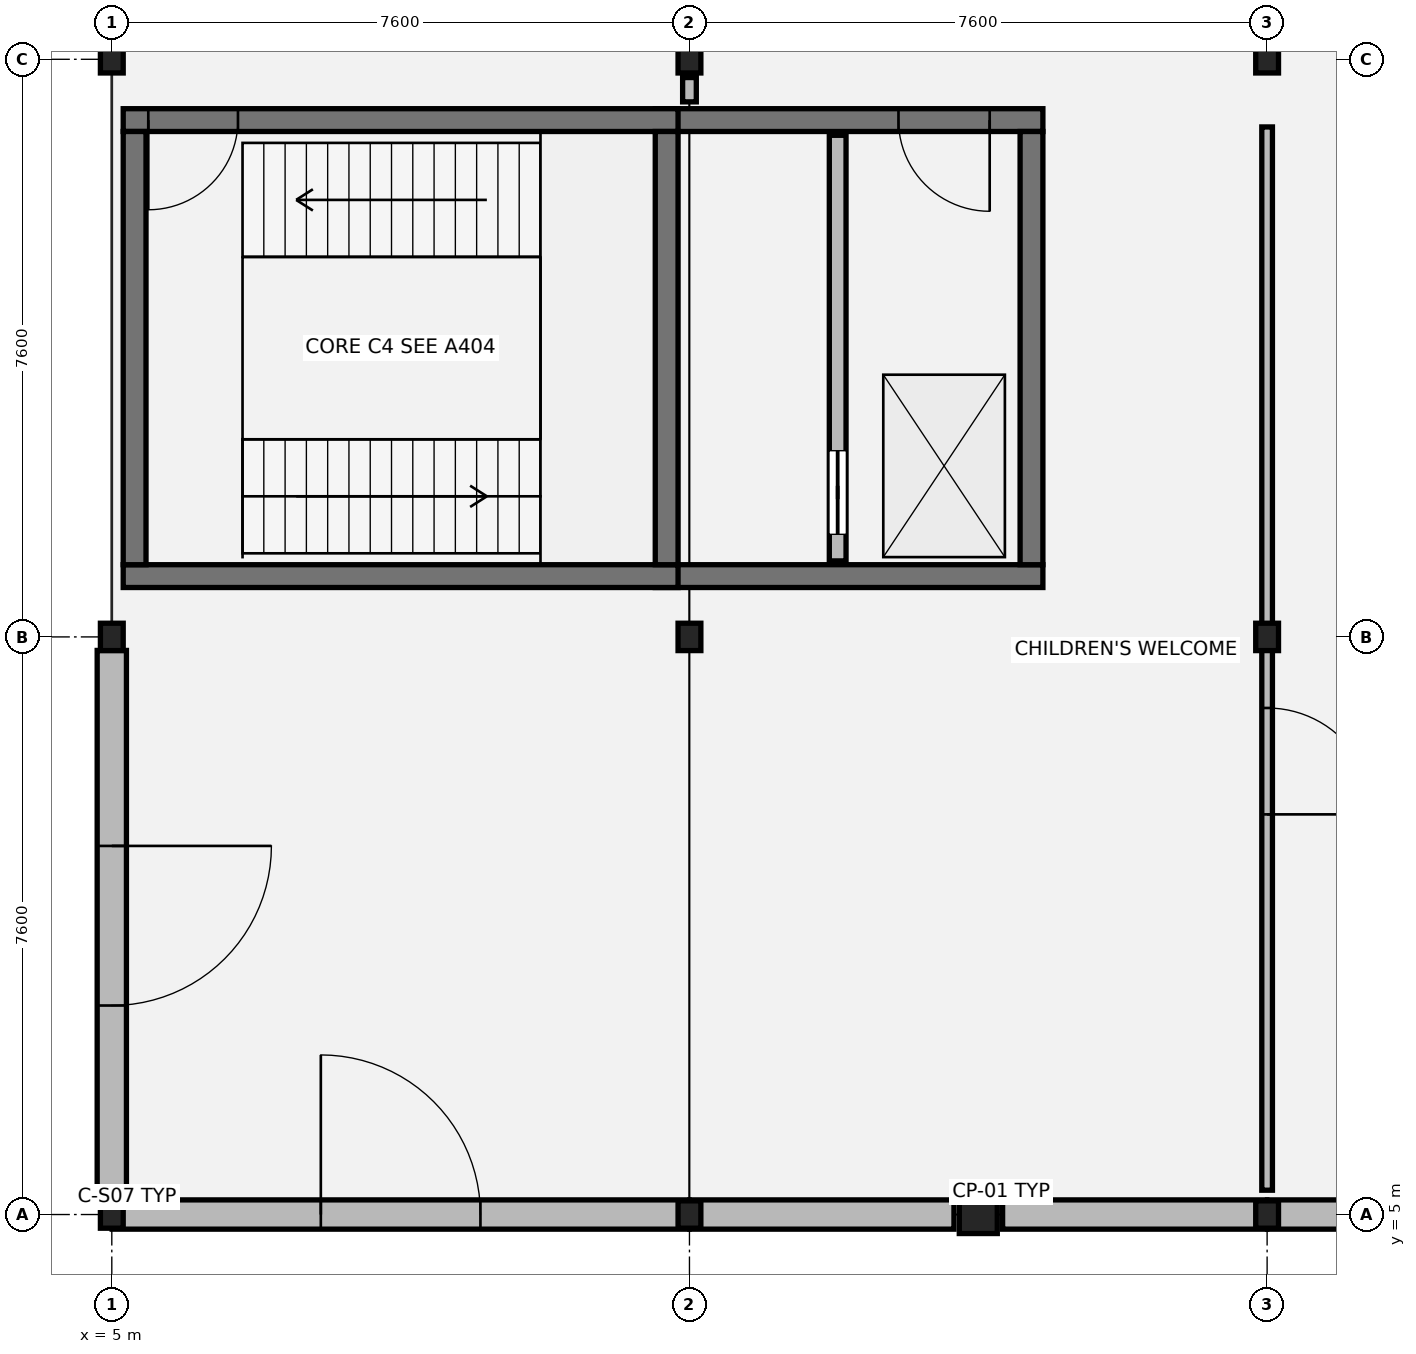
"""IFC4 building model, lengths in metres.
Left out: names, types, materials, properties, quantities, classifications, styles, units other than length and angle.
Written with IfcOpenShell. Run it as: python <this file> out.ifc"""

import sys

from ifc_helpers import new_model, si_unit, direction, frame, frame_2d, origin, origin_2d, place, context, subcontext, project, spatial, rectangle, i_section, extrude, element, fill, save


model = new_model("IFC4")
c1 = context("Model", 3, precision=1e-05, world=origin(), true_north=direction((0.0, 1.0)))
c2 = subcontext(c1, "Body", "Model", "MODEL_VIEW")
j1 = project(units=[si_unit("LENGTHUNIT", "METRE"), si_unit("PLANEANGLEUNIT", "RADIAN")], contexts=[c1])
p1 = place(None, origin())
s1 = spatial("IfcSite", under=j1, at=p1, CompositionType="ELEMENT")
p2 = place(p1, origin())
s2 = spatial("IfcBuilding", under=s1, at=p2, CompositionType="ELEMENT")
p3 = place(p2, origin())
s3 = spatial("IfcBuildingStorey", under=s2, at=p3, CompositionType="ELEMENT", Elevation=0.0)
for number, where, z_axis, x_axis in (
    (1, (5.0, 5.0, 0.0), (0.0, 0.0, 1.0), (1.0, 0.0, 0.0)),
    (2, (5.0, 12.6, 0.0), (0.0, 0.0, 1.0), (1.0, 0.0, 0.0)),
    (3, (5.0, 20.2, 0.0), (0.0, 0.0, 1.0), (1.0, 0.0, 0.0)),
    (4, (12.6, 5.0, 0.0), (0.0, 0.0, 1.0), (1.0, 0.0, 0.0)),
    (5, (12.6, 12.6, 0.0), (0.0, 0.0, 1.0), (1.0, 0.0, 0.0)),
    (6, (12.6, 20.2, 0.0), (0.0, 0.0, 1.0), (1.0, 0.0, 0.0)),
    (7, (20.2, 5.0, 0.0), (0.0, 0.0, 1.0), (1.0, 0.0, 0.0)),
    (8, (20.2, 12.6, 0.0), (0.0, 0.0, 1.0), (1.0, 0.0, 0.0)),
    (9, (20.2, 20.2, 0.0), (0.0, 0.0, 1.0), (1.0, 0.0, 0.0)),
):
    element("IfcColumn", number, at=place(p3, frame(where, z_axis=z_axis, x_axis=x_axis)), inside=s3, PredefinedType="COLUMN", context=c2, shape_type="SweptSolid", body=[
        extrude(i_section(OverallWidth=0.3, OverallDepth=0.36, WebThickness=0.012, FlangeThickness=0.022, at=origin_2d()), origin(), (0.0, 0.0, 1.0), 5.075),
    ])
p4 = place(p3, frame((16.4, 5.0, 0.0), z_axis=(0.0, 0.0, 1.0), x_axis=(1.0, 0.0, 0.0)))
e10 = element("IfcColumn", 10, at=p4, inside=s3, PredefinedType="PILASTER", context=c2, shape_type="SweptSolid", body=[
    extrude(rectangle(XDim=0.5, YDim=0.5, at=origin_2d()), origin(), (0.0, 0.0, 1.0), 4.845),
])
p5 = place(p3, frame((5.005, 5.0, 0.0), z_axis=(0.0, 0.0, 1.0), x_axis=(1.0, 0.0, 0.0)))
e11 = element("IfcWall", 11, at=p5, inside=s3, PredefinedType="SOLIDWALL", context=c2, shape_type="SweptSolid", body=[
    extrude(rectangle(XDim=7.59, YDim=0.385, at=frame_2d((3.795, 0.0))), origin(), (0.0, 0.0, 1.0), 4.5),
])
p6 = place(p5, frame((2.745, 0.0, 0.0)))
e12 = element("IfcOpeningElement", 12, at=p6, cuts=e11, PredefinedType="OPENING", context=c2, shape_type="SweptSolid", body=[
    extrude(rectangle(XDim=2.1, YDim=2.48, at=frame_2d((1.05, 1.24))), frame((0.0, 0.202, 0.0), z_axis=(0.0, -1.0, 0.0), x_axis=(1.0, 0.0, 0.0)), (0.0, 0.0, 1.0), 0.405),
])
for number, where, z_axis, x_axis in (
    (13, (12.605, 5.0, 0.0), (0.0, 0.0, 1.0), (1.0, 0.0, 0.0)),
    (14, (16.72, 5.0, 0.0), (0.0, 0.0, 1.0), (1.0, 0.0, 0.0)),
):
    element("IfcWall", number, at=place(p3, frame(where, z_axis=z_axis, x_axis=x_axis)), inside=s3, PredefinedType="SOLIDWALL", context=c2, shape_type="SweptSolid", body=[
        extrude(rectangle(XDim=3.475, YDim=0.385, at=frame_2d((1.738, 0.0))), origin(), (0.0, 0.0, 1.0), 4.5),
    ])
p7 = place(p3, frame((20.205, 5.0, 0.0), z_axis=(0.0, 0.0, 1.0), x_axis=(1.0, 0.0, 0.0)))
e15 = element("IfcWall", 15, at=p7, inside=s3, PredefinedType="SOLIDWALL", context=c2, shape_type="SweptSolid", body=[
    extrude(rectangle(XDim=7.59, YDim=0.385, at=frame_2d((3.795, 0.0))), origin(), (0.0, 0.0, 1.0), 4.5),
])
p8 = place(p7, frame((2.595, 0.0, 0.0)))
e16 = element("IfcOpeningElement", 16, at=p8, cuts=e15, PredefinedType="OPENING", context=c2, shape_type="SweptSolid", body=[
    extrude(rectangle(XDim=2.4, YDim=2.6, at=frame_2d((1.2, 1.3))), frame((0.0, 0.202, 0.0), z_axis=(0.0, -1.0, 0.0), x_axis=(1.0, 0.0, 0.0)), (0.0, 0.0, 1.0), 0.405),
])
p9 = place(p3, frame((5.0, 12.422, 0.0), z_axis=(0.0, 0.0, 1.0), x_axis=(0.0, -1.0, 0.0)))
e17 = element("IfcWall", 17, at=p9, inside=s3, PredefinedType="SOLIDWALL", context=c2, shape_type="SweptSolid", body=[
    extrude(rectangle(XDim=7.244, YDim=0.385, at=frame_2d((3.622, 0.0))), origin(), (0.0, 0.0, 1.0), 4.5),
])
p10 = place(p9, frame((2.572, 0.0, 0.0)))
e18 = element("IfcOpeningElement", 18, at=p10, cuts=e17, PredefinedType="OPENING", context=c2, shape_type="SweptSolid", body=[
    extrude(rectangle(XDim=2.1, YDim=2.48, at=frame_2d((1.05, 1.24))), frame((0.0, 0.202, 0.0), z_axis=(0.0, -1.0, 0.0), x_axis=(1.0, 0.0, 0.0)), (0.0, 0.0, 1.0), 0.405),
])
p11 = place(p3, frame((12.15, 13.4, 0.0), z_axis=(0.0, 0.0, 1.0), x_axis=(1.0, 0.0, 0.0)))
e19 = element("IfcWall", 19, at=p11, inside=s3, PredefinedType="SHEAR", context=c2, shape_type="SweptSolid", body=[
    extrude(rectangle(XDim=5.1, YDim=0.3, at=frame_2d((2.55, 0.0))), origin(), (0.0, 0.0, 1.0), 4.922),
])
p12 = place(p3, frame((17.25, 19.4, 0.0), z_axis=(0.0, 0.0, 1.0), x_axis=(-1.0, 0.0, 0.0)))
e20 = element("IfcWall", 20, at=p12, inside=s3, PredefinedType="SHEAR", context=c2, shape_type="SweptSolid", body=[
    extrude(rectangle(XDim=5.1, YDim=0.3, at=frame_2d((2.55, 0.0))), origin(), (0.0, 0.0, 1.0), 4.922),
])
p13 = place(p12, frame((0.7, 0.0, 0.0)))
e21 = element("IfcOpeningElement", 21, at=p13, cuts=e20, PredefinedType="OPENING", context=c2, shape_type="SweptSolid", body=[
    extrude(rectangle(XDim=1.2, YDim=2.16, at=frame_2d((0.6, 1.08))), frame((0.0, 0.16, 0.0), z_axis=(0.0, -1.0, 0.0), x_axis=(1.0, 0.0, 0.0)), (0.0, 0.0, 1.0), 0.32),
])
p14 = place(p3, frame((17.1, 13.55, 0.0), z_axis=(0.0, 0.0, 1.0), x_axis=(0.0, 1.0, 0.0)))
e22 = element("IfcWall", 22, at=p14, inside=s3, PredefinedType="SHEAR", context=c2, shape_type="SweptSolid", body=[
    extrude(rectangle(XDim=5.7, YDim=0.3, at=frame_2d((2.85, 0.0))), origin(), (0.0, 0.0, 1.0), 4.922),
])
p15 = place(p3, frame((14.55, 13.6, 0.0), z_axis=(0.0, 0.0, 1.0), x_axis=(0.0, 1.0, 0.0)))
e23 = element("IfcWall", 23, at=p15, inside=s3, PredefinedType="SOLIDWALL", context=c2, shape_type="SweptSolid", body=[
    extrude(rectangle(XDim=5.6, YDim=0.22, at=frame_2d((2.8, 0.0))), origin(), (0.0, 0.0, 1.0), 4.922),
])
p16 = place(p15, frame((0.35, 0.0, 0.0)))
e24 = element("IfcOpeningElement", 24, at=p16, cuts=e23, PredefinedType="OPENING", context=c2, shape_type="SweptSolid", body=[
    extrude(rectangle(XDim=1.1, YDim=2.15, at=frame_2d((0.55, 1.075))), frame((0.0, 0.12, 0.0), z_axis=(0.0, -1.0, 0.0), x_axis=(1.0, 0.0, 0.0)), (0.0, 0.0, 1.0), 0.24),
])
p17 = place(p3, frame((5.15, 13.4, 0.0), z_axis=(0.0, 0.0, 1.0), x_axis=(1.0, 0.0, 0.0)))
e25 = element("IfcWall", 25, at=p17, inside=s3, PredefinedType="SHEAR", context=c2, shape_type="SweptSolid", body=[
    extrude(rectangle(XDim=7.3, YDim=0.3, at=frame_2d((3.65, 0.0))), origin(), (0.0, 0.0, 1.0), 4.922),
])
p18 = place(p3, frame((5.15, 19.4, 0.0), z_axis=(0.0, 0.0, 1.0), x_axis=(1.0, 0.0, 0.0)))
e26 = element("IfcWall", 26, at=p18, inside=s3, PredefinedType="SHEAR", context=c2, shape_type="SweptSolid", body=[
    extrude(rectangle(XDim=7.3, YDim=0.3, at=frame_2d((3.65, 0.0))), origin(), (0.0, 0.0, 1.0), 4.922),
])
p19 = place(p18, frame((0.33, 0.0, 0.0)))
e27 = element("IfcOpeningElement", 27, at=p19, cuts=e26, PredefinedType="OPENING", context=c2, shape_type="SweptSolid", body=[
    extrude(rectangle(XDim=1.18, YDim=2.18, at=frame_2d((0.59, 1.09))), frame((0.0, 0.16, 0.0), z_axis=(0.0, -1.0, 0.0), x_axis=(1.0, 0.0, 0.0)), (0.0, 0.0, 1.0), 0.32),
])
for number, where, z_axis, x_axis in (
    (28, (5.3, 13.55, 0.0), (0.0, 0.0, 1.0), (0.0, 1.0, 0.0)),
    (29, (12.3, 13.55, 0.0), (0.0, 0.0, 1.0), (0.0, 1.0, 0.0)),
):
    element("IfcWall", number, at=place(p3, frame(where, z_axis=z_axis, x_axis=x_axis)), inside=s3, PredefinedType="SHEAR", context=c2, shape_type="SweptSolid", body=[
        extrude(rectangle(XDim=5.7, YDim=0.3, at=frame_2d((2.85, 0.0))), origin(), (0.0, 0.0, 1.0), 4.922),
    ])
p20 = place(p3, frame((12.6, 19.64, 0.0), z_axis=(0.0, 0.0, 1.0), x_axis=(0.0, 1.0, 0.0)))
e30 = element("IfcWall", 30, at=p20, inside=s3, PredefinedType="PARTITIONING", context=c2, shape_type="SweptSolid", body=[
    extrude(rectangle(XDim=0.32, YDim=0.18, at=frame_2d((0.16, 0.0))), origin(), (0.0, 0.0, 1.0), 4.2),
])
p21 = place(p3, frame((20.2, 5.32, 0.0), z_axis=(0.0, 0.0, 1.0), x_axis=(0.0, 1.0, 0.0)))
e31 = element("IfcWall", 31, at=p21, inside=s3, PredefinedType="PARTITIONING", context=c2, shape_type="SweptSolid", body=[
    extrude(rectangle(XDim=13.99, YDim=0.14, at=frame_2d((6.995, 0.0))), origin(), (0.0, 0.0, 1.0), 4.2),
])
p22 = place(p21, frame((4.945, 0.0, 0.0)))
e32 = element("IfcOpeningElement", 32, at=p22, cuts=e31, PredefinedType="OPENING", context=c2, shape_type="SweptSolid", body=[
    extrude(rectangle(XDim=1.4, YDim=2.22, at=frame_2d((0.7, 1.11))), frame((0.0, 0.08, 0.0), z_axis=(0.0, -1.0, 0.0), x_axis=(1.0, 0.0, 0.0)), (0.0, 0.0, 1.0), 0.16),
])
p23 = place(p6, origin())
e33 = element("IfcDoor", 33, at=p23, inside=s3, OperationType="SINGLE_SWING_LEFT", PredefinedType="DOOR", context=c2, shape_type="SweptSolid", body=[
    extrude(rectangle(XDim=2.1, YDim=2.48, at=frame_2d((1.05, 1.24))), frame((0.0, 0.025, 0.0), z_axis=(0.0, -1.0, 0.0), x_axis=(1.0, 0.0, 0.0)), (0.0, 0.0, 1.0), 0.05),
])
fill(e12, e33)
p24 = place(p10, origin())
e34 = element("IfcDoor", 34, at=p24, inside=s3, OperationType="SINGLE_SWING_LEFT", PredefinedType="DOOR", context=c2, shape_type="SweptSolid", body=[
    extrude(rectangle(XDim=2.1, YDim=2.48, at=frame_2d((1.05, 1.24))), frame((0.0, 0.025, 0.0), z_axis=(0.0, -1.0, 0.0), x_axis=(1.0, 0.0, 0.0)), (0.0, 0.0, 1.0), 0.05),
])
fill(e18, e34)
p25 = place(p13, origin())
e35 = element("IfcDoor", 35, at=p25, inside=s3, OperationType="SINGLE_SWING_LEFT", PredefinedType="DOOR", context=c2, shape_type="SweptSolid", body=[
    extrude(rectangle(XDim=1.2, YDim=2.16, at=frame_2d((0.6, 1.08))), frame((0.0, 0.025, 0.0), z_axis=(0.0, -1.0, 0.0), x_axis=(1.0, 0.0, 0.0)), (0.0, 0.0, 1.0), 0.05),
])
fill(e21, e35)
p26 = place(p16, origin())
e36 = element("IfcDoor", 36, at=p26, inside=s3, OperationType="SLIDING_TO_LEFT", PredefinedType="DOOR", context=c2, shape_type="SweptSolid", body=[
    extrude(rectangle(XDim=1.1, YDim=2.15, at=frame_2d((0.55, 1.075))), frame((0.0, 0.025, 0.0), z_axis=(0.0, -1.0, 0.0), x_axis=(1.0, 0.0, 0.0)), (0.0, 0.0, 1.0), 0.05),
])
fill(e24, e36)
p27 = place(p19, origin())
e37 = element("IfcDoor", 37, at=p27, inside=s3, OperationType="SINGLE_SWING_RIGHT", PredefinedType="DOOR", context=c2, shape_type="SweptSolid", body=[
    extrude(rectangle(XDim=1.18, YDim=2.18, at=frame_2d((0.59, 1.09))), frame((0.0, 0.025, 0.0), z_axis=(0.0, -1.0, 0.0), x_axis=(1.0, 0.0, 0.0)), (0.0, 0.0, 1.0), 0.05),
])
fill(e27, e37)
p28 = place(p22, origin())
e38 = element("IfcDoor", 38, at=p28, inside=s3, OperationType="SINGLE_SWING_RIGHT", PredefinedType="DOOR", context=c2, shape_type="SweptSolid", body=[
    extrude(rectangle(XDim=1.4, YDim=2.22, at=frame_2d((0.7, 1.11))), frame((0.0, 0.025, 0.0), z_axis=(0.0, -1.0, 0.0), x_axis=(1.0, 0.0, 0.0)), (0.0, 0.0, 1.0), 0.05),
])
fill(e32, e38)
save(model, sys.argv[1])
